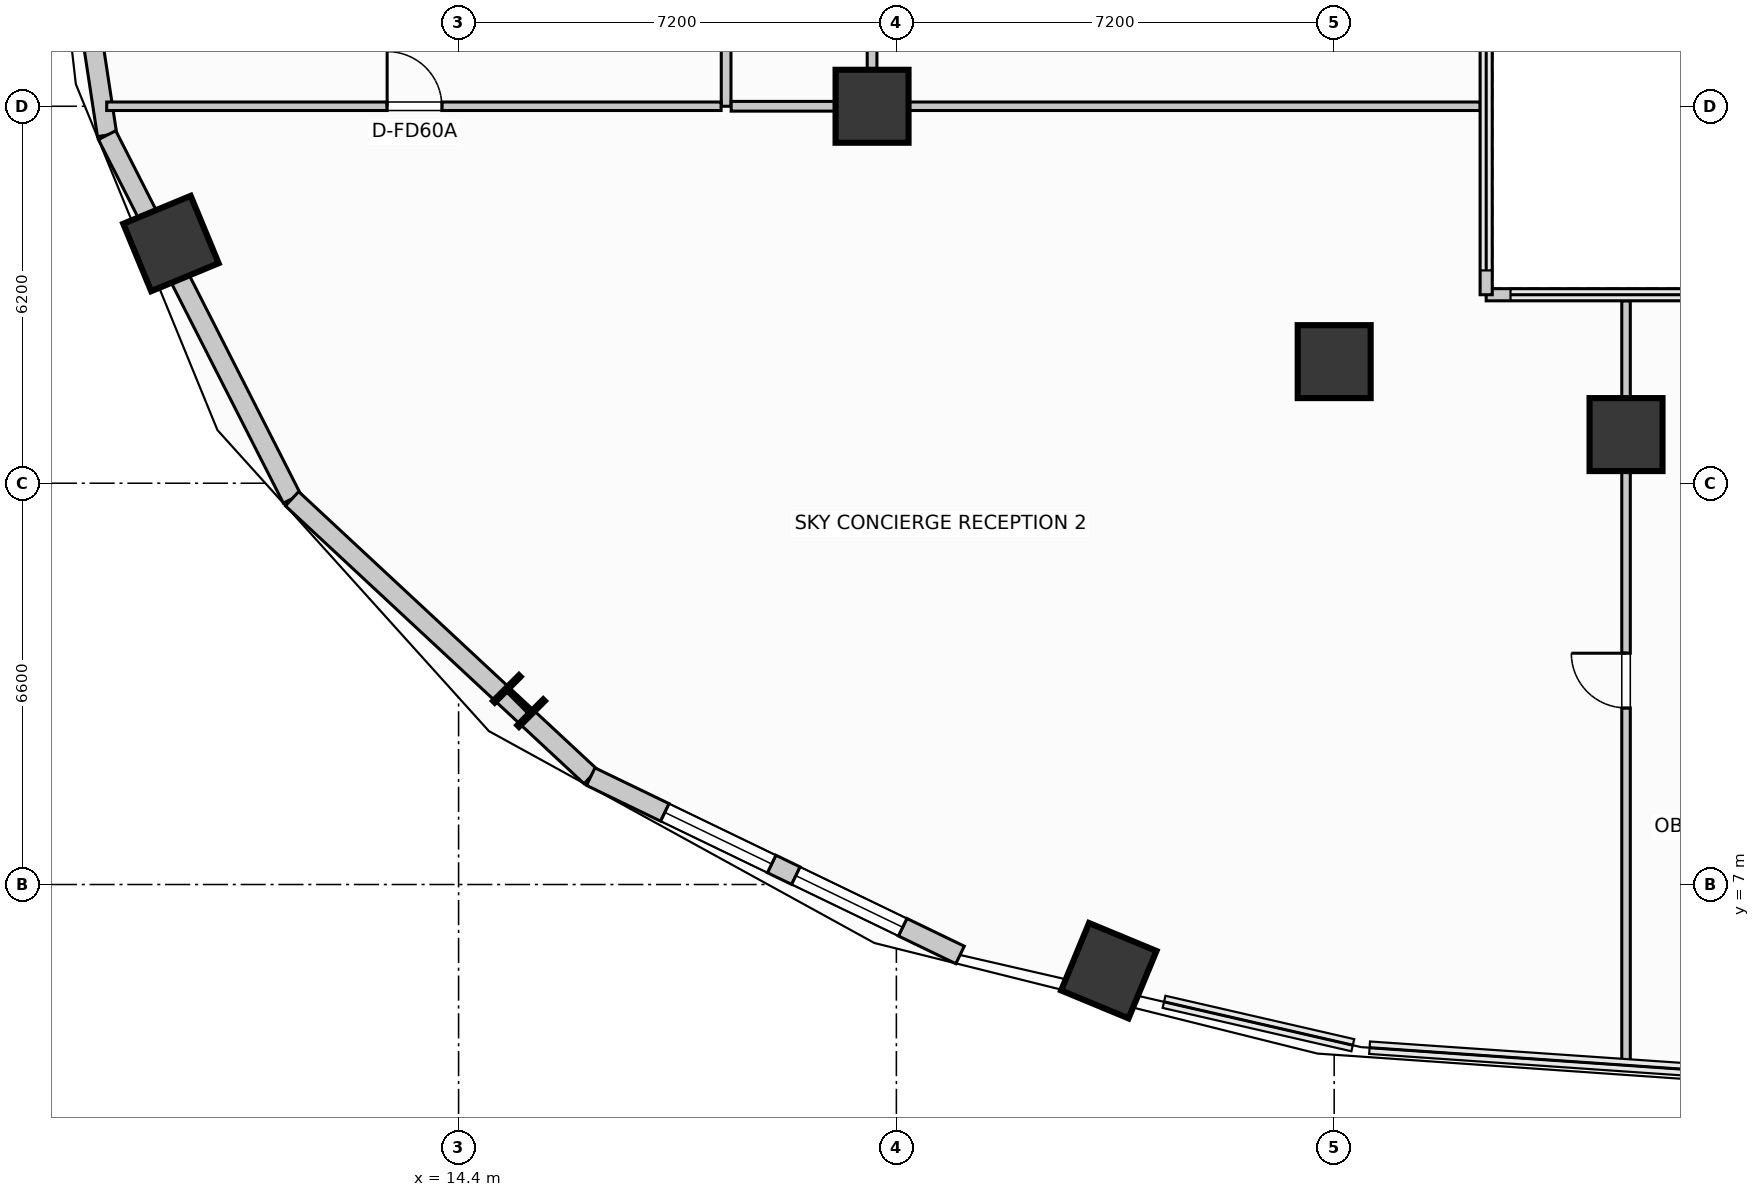
"""IFC4 building model, lengths in metres.
Left out: names, types, materials, properties, quantities, classifications, styles, units other than length and angle.
Written with IfcOpenShell. Run it as: python <this file> out.ifc"""

import sys

from ifc_helpers import new_model, si_unit, direction, frame, frame_2d, origin, origin_2d, place, context, subcontext, project, spatial, rectangle, i_section, extrude, element, fill, save


model = new_model("IFC4")
c1 = context("Model", 3, precision=1e-05, world=origin(), true_north=direction((0.0, 1.0)))
c2 = subcontext(c1, "Body", "Model", "MODEL_VIEW")
j1 = project(units=[si_unit("LENGTHUNIT", "METRE"), si_unit("PLANEANGLEUNIT", "RADIAN")], contexts=[c1])
p1 = place(None, origin())
s1 = spatial("IfcSite", under=j1, at=p1, CompositionType="ELEMENT")
p2 = place(p1, origin())
s2 = spatial("IfcBuilding", under=s1, at=p2, CompositionType="ELEMENT")
p3 = place(p2, frame((0.0, 0.0, 105.95)))
s3 = spatial("IfcBuildingStorey", under=s2, at=p3, CompositionType="ELEMENT", Elevation=105.95)
for number, where, z_axis, x_axis in (
    (1, (33.6, 14.4, 0.0), (0.0, 0.0, 1.0), (1.0, 0.0, 0.0)),
    (2, (28.8, 15.6, 0.0), (0.0, 0.0, 1.0), (1.0, 0.0, 0.0)),
    (3, (21.2, 19.8, 0.0), (0.0, 0.0, 1.0), (1.0, 0.0, 0.0)),
    (4, (9.669, 17.543, 0.0), (0.0, 0.0, 1.0), (-0.924, -0.383, 0.0)),
):
    element("IfcColumn", number, at=place(p3, frame(where, z_axis=z_axis, x_axis=x_axis)), inside=s3, PredefinedType="COLUMN", context=c2, shape_type="SweptSolid", body=[
        extrude(rectangle(XDim=1.2, YDim=1.2, at=origin_2d()), origin(), (0.0, 0.0, 1.0), 4.5),
    ])
p4 = place(p3, frame((15.393, 10.018, 0.0), z_axis=(0.0, 0.0, 1.0), x_axis=(-0.707106781187, -0.707106781187, 0.0)))
e5 = element("IfcColumn", 5, at=p4, inside=s3, PredefinedType="COLUMN", context=c2, shape_type="SweptSolid", body=[
    extrude(i_section(OverallWidth=0.6, OverallDepth=0.6, WebThickness=0.025, FlangeThickness=0.036, at=origin_2d()), origin(), (0.0, 0.0, 1.0), 4.5),
])
p5 = place(p3, frame((25.094, 5.582, 0.0), z_axis=(0.0, 0.0, 1.0), x_axis=(-0.382683432365, -0.923879532511, 0.0)))
e6 = element("IfcColumn", 6, at=p5, inside=s3, PredefinedType="COLUMN", context=c2, shape_type="SweptSolid", body=[
    extrude(rectangle(XDim=1.2, YDim=1.2, at=origin_2d()), origin(), (0.0, 0.0, 1.0), 4.5),
])
p6 = place(p3, frame((7.602, 26.0, 0.0), z_axis=(0.0, 0.0, 1.0), x_axis=(0.150633288003, -0.988589708901, 0.0)))
e7 = element("IfcWall", 7, at=p6, inside=s3, PredefinedType="STANDARD", context=c2, shape_type="SweptSolid", body=[
    extrude(rectangle(XDim=6.752, YDim=0.32, at=frame_2d((3.376, 0.0))), origin(), (0.0, 0.0, 1.0), 4.26),
])
p7 = place(p6, frame((3.028, 0.0, 0.75)))
e8 = element("IfcOpeningElement", 8, at=p7, cuts=e7, PredefinedType="OPENING", context=c2, shape_type="SweptSolid", body=[
    extrude(rectangle(XDim=1.95, YDim=1.68, at=frame_2d((0.975, 0.84))), frame((0.0, 0.17, 0.0), z_axis=(0.0, -1.0, 0.0), x_axis=(1.0, 0.0, 0.0)), (0.0, 0.0, 1.0), 0.34),
])
p8 = place(p3, frame((8.619, 19.325, 0.0), z_axis=(0.0, 0.0, 1.0), x_axis=(0.453374078001, -0.89132033826, 0.0)))
e9 = element("IfcWall", 9, at=p8, inside=s3, PredefinedType="STANDARD", context=c2, shape_type="SweptSolid", body=[
    extrude(rectangle(XDim=6.71, YDim=0.32, at=frame_2d((3.355, 0.0))), origin(), (0.0, 0.0, 1.0), 3.619),
])
p9 = place(p3, frame((11.661, 13.344, 0.0), z_axis=(0.0, 0.0, 1.0), x_axis=(0.732137360086, -0.681157020052, 0.0)))
e10 = element("IfcWall", 10, at=p9, inside=s3, PredefinedType="STANDARD", context=c2, shape_type="SweptSolid", body=[
    extrude(rectangle(XDim=6.709, YDim=0.32, at=frame_2d((3.354, 0.0))), origin(), (0.0, 0.0, 1.0), 3.619),
])
p10 = place(p3, frame((16.573, 8.774, 0.0), z_axis=(0.0, 0.0, 1.0), x_axis=(0.900510094661, -0.434835106004, 0.0)))
e11 = element("IfcWall", 11, at=p10, inside=s3, PredefinedType="STANDARD", context=c2, shape_type="SweptSolid", body=[
    extrude(rectangle(XDim=6.745, YDim=0.32, at=frame_2d((3.373, 0.0))), origin(), (0.0, 0.0, 1.0), 4.26),
])
p11 = place(p10, frame((1.354, 0.0, 0.75)))
e12 = element("IfcOpeningElement", 12, at=p11, cuts=e11, PredefinedType="OPENING", context=c2, shape_type="SweptSolid", body=[
    extrude(rectangle(XDim=1.95, YDim=1.68, at=frame_2d((0.975, 0.84))), frame((0.0, 0.17, 0.0), z_axis=(0.0, -1.0, 0.0), x_axis=(1.0, 0.0, 0.0)), (0.0, 0.0, 1.0), 0.34),
])
p12 = place(p10, frame((3.746, 0.0, 0.75)))
e13 = element("IfcOpeningElement", 13, at=p12, cuts=e11, PredefinedType="OPENING", context=c2, shape_type="SweptSolid", body=[
    extrude(rectangle(XDim=1.95, YDim=1.68, at=frame_2d((0.975, 0.84))), frame((0.0, 0.17, 0.0), z_axis=(0.0, -1.0, 0.0), x_axis=(1.0, 0.0, 0.0)), (0.0, 0.0, 1.0), 0.34),
])
p13 = place(p3, frame((40.7, 16.7, 0.0), z_axis=(0.0, 0.0, 1.0), x_axis=(-1.0, 0.0, 0.0)))
e14 = element("IfcWall", 14, at=p13, inside=s3, PredefinedType="PARTITIONING", context=c2, shape_type="SweptSolid", body=[
    extrude(rectangle(XDim=9.4, YDim=0.2, at=frame_2d((4.7, 0.0))), origin(), (0.0, 0.0, 1.0), 4.245),
])
p14 = place(p3, frame((31.3, 16.7, 0.0), z_axis=(0.0, 0.0, 1.0), x_axis=(0.0, 1.0, 0.0)))
e15 = element("IfcWall", 15, at=p14, inside=s3, PredefinedType="PARTITIONING", context=c2, shape_type="SweptSolid", body=[
    extrude(rectangle(XDim=7.0, YDim=0.2, at=frame_2d((3.5, 0.0))), origin(), (0.0, 0.0, 1.0), 4.245),
])
p15 = place(p3, frame((18.8, 19.8, 0.0), z_axis=(0.0, 0.0, 1.0), x_axis=(0.0, 1.0, 0.0)))
e16 = element("IfcWall", 16, at=p15, inside=s3, PredefinedType="PARTITIONING", context=c2, shape_type="SweptSolid", body=[
    extrude(rectangle(XDim=15.75, YDim=0.16, at=frame_2d((7.875, 0.0))), origin(), (0.0, 0.0, 1.0), 4.245),
])
p16 = place(p15, frame((3.334, 0.0, 0.0)))
e17 = element("IfcOpeningElement", 17, at=p16, cuts=e16, PredefinedType="OPENING", context=c2, shape_type="SweptSolid", body=[
    extrude(rectangle(XDim=0.9, YDim=2.0, at=frame_2d((0.45, 1.0))), frame((0.0, 0.09, 0.0), z_axis=(0.0, -1.0, 0.0), x_axis=(1.0, 0.0, 0.0)), (0.0, 0.0, 1.0), 0.18),
])
p17 = place(p15, frame((12.527, 0.0, 0.0)))
e18 = element("IfcOpeningElement", 18, at=p17, cuts=e16, PredefinedType="OPENING", context=c2, shape_type="SweptSolid", body=[
    extrude(rectangle(XDim=0.9, YDim=2.0, at=frame_2d((0.45, 1.0))), frame((0.0, 0.09, 0.0), z_axis=(0.0, -1.0, 0.0), x_axis=(1.0, 0.0, 0.0)), (0.0, 0.0, 1.0), 0.18),
])
p18 = place(p3, frame((18.883, 19.8, 0.0), z_axis=(0.0, 0.0, 1.0), x_axis=(1.0, 0.0, 0.0)))
e19 = element("IfcWall", 19, at=p18, inside=s3, PredefinedType="PARTITIONING", context=c2, shape_type="SweptSolid", body=[
    extrude(rectangle(XDim=2.437, YDim=0.16, at=frame_2d((1.219, 0.0))), origin(), (0.0, 0.0, 1.0), 3.618),
])
p19 = place(p3, frame((21.2, 19.883, 0.0), z_axis=(0.0, 0.0, 1.0), x_axis=(0.0, 1.0, 0.0)))
e20 = element("IfcWall", 20, at=p19, inside=s3, PredefinedType="PARTITIONING", context=c2, shape_type="SweptSolid", body=[
    extrude(rectangle(XDim=4.334, YDim=0.16, at=frame_2d((2.167, 0.0))), origin(), (0.0, 0.0, 1.0), 4.245),
])
p20 = place(p3, frame((33.6, 4.092, 0.0), z_axis=(0.0, 0.0, 1.0), x_axis=(0.0, 1.0, 0.0)))
e21 = element("IfcWall", 21, at=p20, inside=s3, PredefinedType="PARTITIONING", context=c2, shape_type="SweptSolid", body=[
    extrude(rectangle(XDim=12.505, YDim=0.14, at=frame_2d((6.253, 0.0))), origin(), (0.0, 0.0, 1.0), 3.618),
])
p21 = place(p20, frame((5.813, 0.0, 0.0)))
e22 = element("IfcOpeningElement", 22, at=p21, cuts=e21, PredefinedType="OPENING", context=c2, shape_type="SweptSolid", body=[
    extrude(rectangle(XDim=0.9, YDim=2.0, at=frame_2d((0.45, 1.0))), frame((0.0, 0.08, 0.0), z_axis=(0.0, -1.0, 0.0), x_axis=(1.0, 0.0, 0.0)), (0.0, 0.0, 1.0), 0.16),
])
p22 = place(p3, frame((8.613, 19.8, 0.0), z_axis=(0.0, 0.0, 1.0), x_axis=(1.0, 0.0, 0.0)))
e23 = element("IfcWall", 23, at=p22, inside=s3, PredefinedType="PARTITIONING", context=c2, shape_type="SweptSolid", body=[
    extrude(rectangle(XDim=10.104, YDim=0.14, at=frame_2d((5.052, 0.0))), origin(), (0.0, 0.0, 1.0), 3.618),
])
p23 = place(p22, frame((4.612, 0.0, 0.0)))
e24 = element("IfcOpeningElement", 24, at=p23, cuts=e23, PredefinedType="OPENING", context=c2, shape_type="SweptSolid", body=[
    extrude(rectangle(XDim=0.9, YDim=2.0, at=frame_2d((0.45, 1.0))), frame((0.0, 0.08, 0.0), z_axis=(0.0, -1.0, 0.0), x_axis=(1.0, 0.0, 0.0)), (0.0, 0.0, 1.0), 0.16),
])
p24 = place(p3, frame((21.32, 19.8, 0.0), z_axis=(0.0, 0.0, 1.0), x_axis=(1.0, 0.0, 0.0)))
e25 = element("IfcWall", 25, at=p24, inside=s3, PredefinedType="PARTITIONING", context=c2, shape_type="SweptSolid", body=[
    extrude(rectangle(XDim=9.877, YDim=0.14, at=frame_2d((4.938, 0.0))), origin(), (0.0, 0.0, 1.0), 4.245),
])
p25 = place(p11, origin())
e26 = element("IfcWindow", 26, at=p25, inside=s3, PartitioningType="SINGLE_PANEL", PredefinedType="WINDOW", context=c2, shape_type="SweptSolid", body=[
    extrude(rectangle(XDim=1.95, YDim=1.68, at=frame_2d((0.975, 0.84))), frame((0.0, 0.03, 0.0), z_axis=(0.0, -1.0, 0.0), x_axis=(1.0, 0.0, 0.0)), (0.0, 0.0, 1.0), 0.06),
])
fill(e12, e26)
p26 = place(p12, origin())
e27 = element("IfcWindow", 27, at=p26, inside=s3, PartitioningType="SINGLE_PANEL", PredefinedType="WINDOW", context=c2, shape_type="SweptSolid", body=[
    extrude(rectangle(XDim=1.95, YDim=1.68, at=frame_2d((0.975, 0.84))), frame((0.0, 0.03, 0.0), z_axis=(0.0, -1.0, 0.0), x_axis=(1.0, 0.0, 0.0)), (0.0, 0.0, 1.0), 0.06),
])
fill(e13, e27)
p27 = place(p23, origin())
e28 = element("IfcDoor", 28, at=p27, inside=s3, OperationType="SINGLE_SWING_LEFT", PredefinedType="DOOR", context=c2, shape_type="SweptSolid", body=[
    extrude(rectangle(XDim=0.9, YDim=2.0, at=frame_2d((0.45, 1.0))), frame((0.0, 0.025, 0.0), z_axis=(0.0, -1.0, 0.0), x_axis=(1.0, 0.0, 0.0)), (0.0, 0.0, 1.0), 0.05),
])
fill(e24, e28)
p28 = place(p21, origin())
e29 = element("IfcDoor", 29, at=p28, inside=s3, OperationType="SINGLE_SWING_RIGHT", PredefinedType="DOOR", context=c2, shape_type="SweptSolid", body=[
    extrude(rectangle(XDim=0.9, YDim=2.0, at=frame_2d((0.45, 1.0))), frame((0.0, 0.025, 0.0), z_axis=(0.0, -1.0, 0.0), x_axis=(1.0, 0.0, 0.0)), (0.0, 0.0, 1.0), 0.05),
])
fill(e22, e29)
save(model, sys.argv[1])
